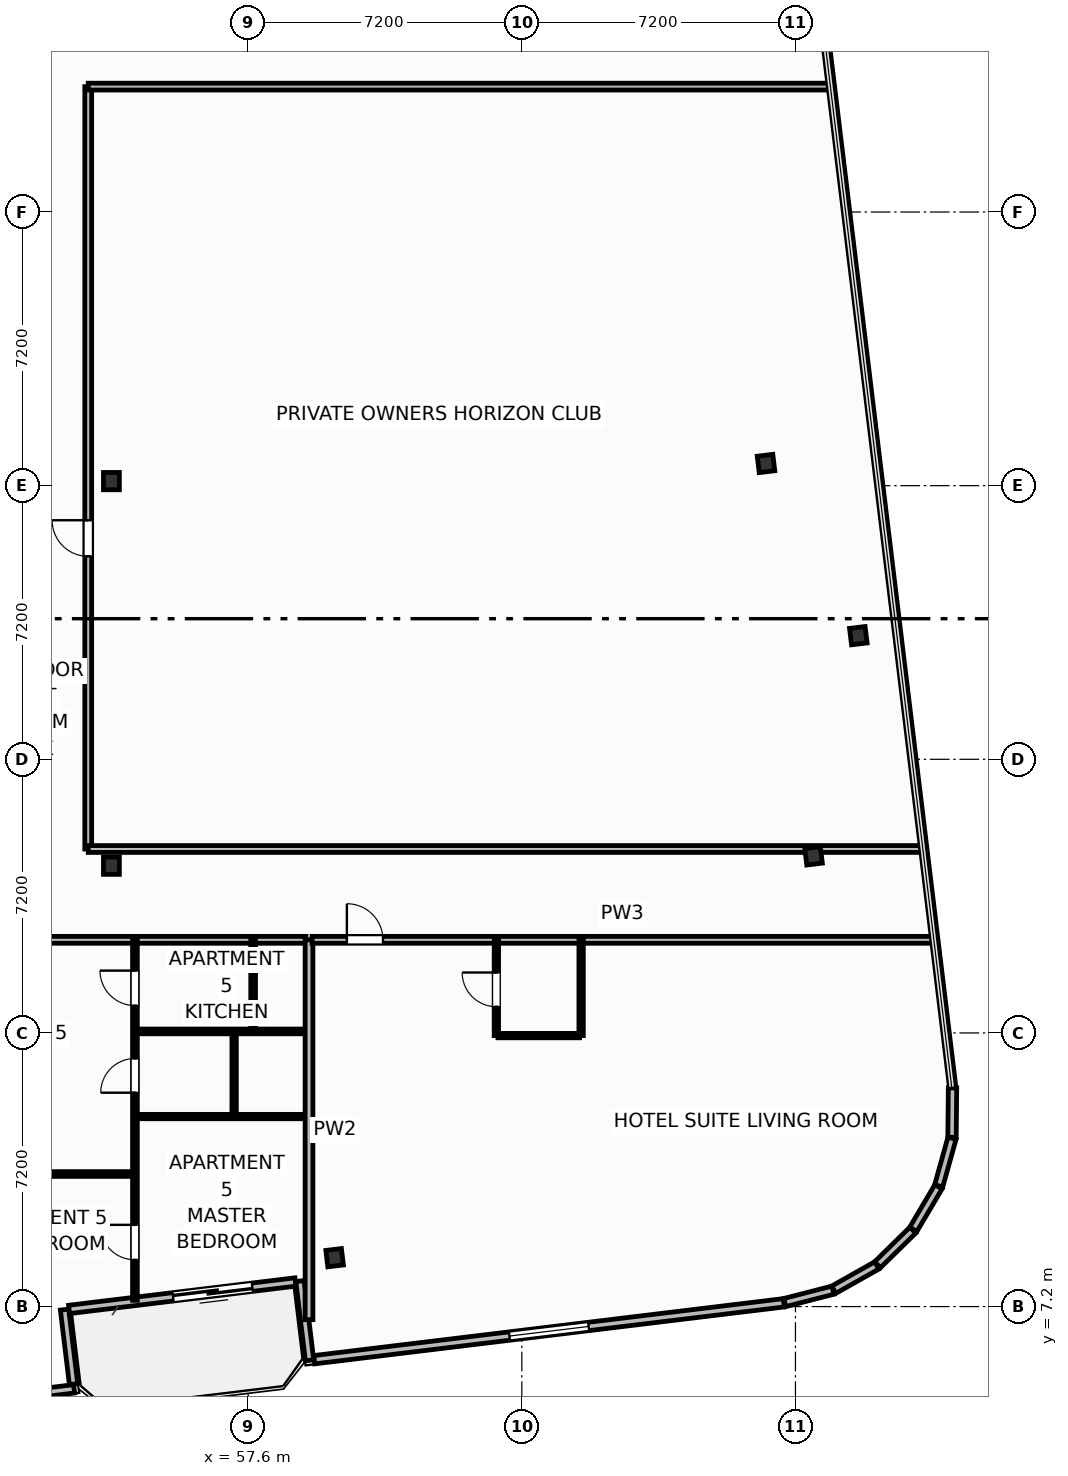
"""IFC4 building model, lengths in metres.
Left out: names, types, materials, properties, quantities, classifications, styles, units other than length and angle.
Written with IfcOpenShell. Run it as: python <this file> out.ifc"""

import sys

from ifc_helpers import new_model, si_unit, direction, frame, frame_2d, origin, origin_2d, place, context, subcontext, project, spatial, rectangle, i_section, extrude, element, fill, save


model = new_model("IFC4")
c1 = context("Model", 3, precision=1e-05, world=origin(), true_north=direction((0.0, 1.0)))
c2 = subcontext(c1, "Body", "Model", "MODEL_VIEW")
j1 = project(units=[si_unit("LENGTHUNIT", "METRE"), si_unit("PLANEANGLEUNIT", "RADIAN")], contexts=[c1])
p1 = place(None, origin())
s1 = spatial("IfcSite", under=j1, at=p1, CompositionType="ELEMENT")
p2 = place(p1, origin())
s2 = spatial("IfcBuilding", under=s1, at=p2, CompositionType="ELEMENT")
p3 = place(p2, frame((0.0, 0.0, 174.6)))
s3 = spatial("IfcBuildingStorey", under=s2, at=p3, CompositionType="ELEMENT", Elevation=174.6)
for number, where, z_axis, x_axis in (
    (1, (54.0, 18.8, 0.0), (0.0, 0.0, 1.0), (1.0, 0.0, 0.0)),
    (2, (54.0, 28.92, 0.0), (0.0, 0.0, 1.0), (1.0, 0.0, 0.0)),
):
    element("IfcColumn", number, at=place(p3, frame(where, z_axis=z_axis, x_axis=x_axis)), inside=s3, PredefinedType="COLUMN", context=c2, shape_type="SweptSolid", body=[
        extrude(i_section(OverallWidth=0.418, OverallDepth=0.455, WebThickness=0.042, FlangeThickness=0.068, FilletRadius=0.025, at=origin_2d()), origin(), (0.0, 0.0, 1.0), 3.7),
    ])
for number, where, z_axis, x_axis in (
    (3, (59.874, 8.486, 0.0), (0.0, 0.0, 1.0), (0.993, 0.12, 0.0)),
    (4, (72.477, 19.059, 0.0), (0.0, 0.0, 1.0), (0.993, 0.12, 0.0)),
    (5, (73.654, 24.853, 0.0), (0.0, 0.0, 1.0), (0.993, 0.12, 0.0)),
    (6, (71.225, 29.384, 0.0), (0.0, 0.0, 1.0), (0.993, 0.12, 0.0)),
):
    element("IfcColumn", number, at=place(p3, frame(where, z_axis=z_axis, x_axis=x_axis)), inside=s3, PredefinedType="COLUMN", context=c2, shape_type="SweptSolid", body=[
        extrude(i_section(OverallWidth=0.412, OverallDepth=0.435, WebThickness=0.036, FlangeThickness=0.057, FilletRadius=0.025, at=origin_2d()), origin(), (0.0, 0.0, 1.0), 3.7),
    ])
p4 = place(p3, frame((58.843, 7.847, 0.0), z_axis=(0.0, 0.0, 1.0), x_axis=(-0.992729951822, -0.120362962556, 0.0)))
e7 = element("IfcWall", 7, at=p4, inside=s3, PredefinedType="SOLIDWALL", context=c2, shape_type="SweptSolid", body=[
    extrude(rectangle(XDim=6.0, YDim=0.22, at=frame_2d((3.0, 0.0))), origin(), (0.0, 0.0, 1.0), 2.73),
])
p5 = place(p4, frame((1.144, 0.0, 0.0)))
e8 = element("IfcOpeningElement", 8, at=p5, cuts=e7, PredefinedType="OPENING", context=c2, shape_type="SweptSolid", body=[
    extrude(rectangle(XDim=2.1, YDim=2.3, at=frame_2d((1.05, 1.15))), frame((0.0, 0.12, 0.0), z_axis=(0.0, -1.0, 0.0), x_axis=(1.0, 0.0, 0.0)), (0.0, 0.0, 1.0), 0.24),
])
p6 = place(p3, frame((45.042, 4.069, 0.0), z_axis=(0.0, 0.0, 1.0), x_axis=(0.992731032022, 0.120354052946, 0.0)))
e9 = element("IfcWall", 9, at=p6, inside=s3, PredefinedType="SOLIDWALL", context=c2, shape_type="SweptSolid", body=[
    extrude(rectangle(XDim=8.035, YDim=0.22, at=frame_2d((4.018, 0.0))), origin(), (0.0, 0.0, 1.0), 2.73),
])
p7 = place(p6, frame((4.273, 0.0, 0.8)))
e10 = element("IfcOpeningElement", 10, at=p7, cuts=e9, PredefinedType="OPENING", context=c2, shape_type="SweptSolid", body=[
    extrude(rectangle(XDim=2.1, YDim=1.75, at=frame_2d((1.05, 0.875))), frame((0.0, 0.12, 0.0), z_axis=(0.0, -1.0, 0.0), x_axis=(1.0, 0.0, 0.0)), (0.0, 0.0, 1.0), 0.24),
])
p8 = place(p3, frame((53.004, 5.16, 0.0), z_axis=(0.0, 0.0, 1.0), x_axis=(-0.120397815541, 0.992725725472, 0.0)))
e11 = element("IfcWall", 11, at=p8, inside=s3, PredefinedType="SOLIDWALL", context=c2, shape_type="SweptSolid", body=[
    extrude(rectangle(XDim=1.975, YDim=0.22, at=frame_2d((0.988, 0.0))), origin(), (0.0, 0.0, 1.0), 2.73),
])
p9 = place(p3, frame((58.961, 7.872, 0.0), z_axis=(0.0, 0.0, 1.0), x_axis=(0.120327895535, -0.992734202874, 0.0)))
e12 = element("IfcWall", 12, at=p9, inside=s3, PredefinedType="SOLIDWALL", context=c2, shape_type="SweptSolid", body=[
    extrude(rectangle(XDim=2.1, YDim=0.22, at=frame_2d((1.05, 0.0))), origin(), (0.0, 0.0, 1.0), 2.73),
])
p10 = place(p3, frame((59.338, 5.802, 0.0), z_axis=(0.0, 0.0, 1.0), x_axis=(0.992731225757, 0.120352454927, 0.0)))
e13 = element("IfcWall", 13, at=p10, inside=s3, PredefinedType="SOLIDWALL", context=c2, shape_type="SweptSolid", body=[
    extrude(rectangle(XDim=12.447, YDim=0.22, at=frame_2d((6.224, 0.0))), origin(), (0.0, 0.0, 1.0), 2.73),
])
p11 = place(p10, frame((5.174, 0.0, 0.8)))
e14 = element("IfcOpeningElement", 14, at=p11, cuts=e13, PredefinedType="OPENING", context=c2, shape_type="SweptSolid", body=[
    extrude(rectangle(XDim=2.1, YDim=1.75, at=frame_2d((1.05, 0.875))), frame((0.0, 0.12, 0.0), z_axis=(0.0, -1.0, 0.0), x_axis=(1.0, 0.0, 0.0)), (0.0, 0.0, 1.0), 0.24),
])
p12 = place(p3, frame((71.719, 7.306, 0.0), z_axis=(0.0, 0.0, 1.0), x_axis=(0.968541764193, 0.248851061909, 0.0)))
e15 = element("IfcWall", 15, at=p12, inside=s3, PredefinedType="SOLIDWALL", context=c2, shape_type="SweptSolid", body=[
    extrude(rectangle(XDim=1.309, YDim=0.22, at=frame_2d((0.654, 0.0))), origin(), (0.0, 0.0, 1.0), 2.73),
])
for number, where, z_axis, x_axis in (
    (16, (73.008, 7.644, 0.0), (0.0, 0.0, 1.0), (0.871, 0.491, 0.0)),
    (17, (74.159, 8.3, 0.0), (0.0, 0.0, 1.0), (0.714, 0.7, 0.0)),
    (18, (75.101, 9.232, 0.0), (0.0, 0.0, 1.0), (0.509, 0.861, 0.0)),
    (19, (75.77, 10.376, 0.0), (0.0, 0.0, 1.0), (0.269, 0.963, 0.0)),
):
    element("IfcWall", number, at=place(p3, frame(where, z_axis=z_axis, x_axis=x_axis)), inside=s3, PredefinedType="SOLIDWALL", context=c2, shape_type="SweptSolid", body=[
        extrude(rectangle(XDim=1.301, YDim=0.22, at=frame_2d((0.65, 0.0))), origin(), (0.0, 0.0, 1.0), 2.73),
    ])
p13 = place(p3, frame((76.12, 11.654, 0.0), z_axis=(0.0, 0.0, 1.0), x_axis=(0.01032033607, 0.999946743914, 0.0)))
e20 = element("IfcWall", 20, at=p13, inside=s3, PredefinedType="SOLIDWALL", context=c2, shape_type="SweptSolid", body=[
    extrude(rectangle(XDim=1.301, YDim=0.22, at=frame_2d((0.65, 0.0))), origin(), (0.0, 0.0, 1.0), 2.73),
])
p14 = place(p3, frame((48.48, 10.688, 0.0), z_axis=(0.0, 0.0, 1.0), x_axis=(1.0, 0.0, 0.0)))
e21 = element("IfcWall", 21, at=p14, inside=s3, PredefinedType="PARTITIONING", context=c2, shape_type="SweptSolid", body=[
    extrude(rectangle(XDim=6.069, YDim=0.125, at=frame_2d((3.035, 0.0))), origin(), (0.0, 0.0, 1.0), 3.45),
])
p15 = place(p14, frame((2.731, 0.0, 0.0)))
e22 = element("IfcOpeningElement", 22, at=p15, cuts=e21, PredefinedType="OPENING", context=c2, shape_type="SweptSolid", body=[
    extrude(rectangle(XDim=0.92, YDim=2.05, at=frame_2d((0.46, 1.025))), frame((0.0, 0.073, 0.0), z_axis=(0.0, -1.0, 0.0), x_axis=(1.0, 0.0, 0.0)), (0.0, 0.0, 1.0), 0.145),
])
p16 = place(p3, frame((48.48, 16.85, 0.0), z_axis=(0.0, 0.0, 1.0), x_axis=(1.0, 0.0, 0.0)))
e23 = element("IfcWall", 23, at=p16, inside=s3, PredefinedType="PARTITIONING", context=c2, shape_type="SweptSolid", body=[
    extrude(rectangle(XDim=10.64, YDim=0.18, at=frame_2d((5.32, 0.0))), origin(), (0.0, 0.0, 1.0), 3.45),
])
p17 = place(p16, frame((2.535, 0.0, 0.0)))
e24 = element("IfcOpeningElement", 24, at=p17, cuts=e23, PredefinedType="OPENING", context=c2, shape_type="SweptSolid", body=[
    extrude(rectangle(XDim=1.0, YDim=2.2, at=frame_2d((0.5, 1.1))), frame((0.0, 0.1, 0.0), z_axis=(0.0, -1.0, 0.0), x_axis=(1.0, 0.0, 0.0)), (0.0, 0.0, 1.0), 0.2),
])
p18 = place(p3, frame((54.619, 7.365, 0.0), z_axis=(0.0, 0.0, 1.0), x_axis=(0.0, 1.0, 0.0)))
e25 = element("IfcWall", 25, at=p18, inside=s3, PredefinedType="PARTITIONING", context=c2, shape_type="SweptSolid", body=[
    extrude(rectangle(XDim=9.485, YDim=0.125, at=frame_2d((4.742, 0.0))), origin(), (0.0, 0.0, 1.0), 3.45),
])
p19 = place(p18, frame((1.065, 0.0, 0.0)))
e26 = element("IfcOpeningElement", 26, at=p19, cuts=e25, PredefinedType="OPENING", context=c2, shape_type="SweptSolid", body=[
    extrude(rectangle(XDim=0.92, YDim=2.05, at=frame_2d((0.46, 1.025))), frame((0.0, 0.073, 0.0), z_axis=(0.0, -1.0, 0.0), x_axis=(1.0, 0.0, 0.0)), (0.0, 0.0, 1.0), 0.145),
])
p20 = place(p18, frame((5.462, 0.0, 0.0)))
e27 = element("IfcOpeningElement", 27, at=p20, cuts=e25, PredefinedType="OPENING", context=c2, shape_type="SweptSolid", body=[
    extrude(rectangle(XDim=0.9, YDim=2.05, at=frame_2d((0.45, 1.025))), frame((0.0, 0.073, 0.0), z_axis=(0.0, -1.0, 0.0), x_axis=(1.0, 0.0, 0.0)), (0.0, 0.0, 1.0), 0.145),
])
p21 = place(p18, frame((7.755, 0.0, 0.0)))
e28 = element("IfcOpeningElement", 28, at=p21, cuts=e25, PredefinedType="OPENING", context=c2, shape_type="SweptSolid", body=[
    extrude(rectangle(XDim=0.92, YDim=2.05, at=frame_2d((0.46, 1.025))), frame((0.0, 0.073, 0.0), z_axis=(0.0, -1.0, 0.0), x_axis=(1.0, 0.0, 0.0)), (0.0, 0.0, 1.0), 0.145),
])
p22 = place(p3, frame((54.689, 14.44, 0.0), z_axis=(0.0, 0.0, 1.0), x_axis=(1.0, 0.0, 0.0)))
e29 = element("IfcWall", 29, at=p22, inside=s3, PredefinedType="PARTITIONING", context=c2, shape_type="SweptSolid", body=[
    extrude(rectangle(XDim=4.431, YDim=0.125, at=frame_2d((2.215, 0.0))), origin(), (0.0, 0.0, 1.0), 3.45),
])
p23 = place(p3, frame((54.689, 12.2, 0.0), z_axis=(0.0, 0.0, 1.0), x_axis=(1.0, 0.0, 0.0)))
e30 = element("IfcWall", 30, at=p23, inside=s3, PredefinedType="PARTITIONING", context=c2, shape_type="SweptSolid", body=[
    extrude(rectangle(XDim=4.431, YDim=0.115, at=frame_2d((2.215, 0.0))), origin(), (0.0, 0.0, 1.0), 3.018),
])
p24 = place(p3, frame((57.729, 14.44, 0.0), z_axis=(0.0, 0.0, 1.0), x_axis=(0.0, 1.0, 0.0)))
e31 = element("IfcWall", 31, at=p24, inside=s3, PredefinedType="PARTITIONING", context=c2, shape_type="SweptSolid", body=[
    extrude(rectangle(XDim=2.41, YDim=0.125, at=frame_2d((1.205, 0.0))), origin(), (0.0, 0.0, 1.0), 3.45),
])
p25 = place(p3, frame((57.229, 12.2, 0.0), z_axis=(0.0, 0.0, 1.0), x_axis=(0.0, 1.0, 0.0)))
e32 = element("IfcWall", 32, at=p25, inside=s3, PredefinedType="PARTITIONING", context=c2, shape_type="SweptSolid", body=[
    extrude(rectangle(XDim=2.24, YDim=0.115, at=frame_2d((1.12, 0.0))), origin(), (0.0, 0.0, 1.0), 3.45),
])
p26 = place(p3, frame((59.2, 6.856, 0.0), z_axis=(0.0, 0.0, 1.0), x_axis=(0.0, 1.0, 0.0)))
e33 = element("IfcWall", 33, at=p26, inside=s3, PredefinedType="PARTITIONING", context=c2, shape_type="SweptSolid", body=[
    extrude(rectangle(XDim=9.994, YDim=0.205, at=frame_2d((4.997, 0.0))), origin(), (0.0, 0.0, 1.0), 3.45),
])
p27 = place(p3, frame((59.28, 16.85, 0.0), z_axis=(0.0, 0.0, 1.0), x_axis=(1.0, 0.0, 0.0)))
e34 = element("IfcWall", 34, at=p27, inside=s3, PredefinedType="PARTITIONING", context=c2, shape_type="SweptSolid", body=[
    extrude(rectangle(XDim=16.322, YDim=0.18, at=frame_2d((8.161, 0.0))), origin(), (0.0, 0.0, 1.0), 3.45),
])
p28 = place(p27, frame((0.916, 0.0, 0.0)))
e35 = element("IfcOpeningElement", 35, at=p28, cuts=e34, PredefinedType="OPENING", context=c2, shape_type="SweptSolid", body=[
    extrude(rectangle(XDim=0.95, YDim=2.15, at=frame_2d((0.475, 1.075))), frame((0.0, 0.1, 0.0), z_axis=(0.0, -1.0, 0.0), x_axis=(1.0, 0.0, 0.0)), (0.0, 0.0, 1.0), 0.2),
])
p29 = place(p3, frame((64.17, 14.33, 0.0), z_axis=(0.0, 0.0, 1.0), x_axis=(1.0, 0.0, 0.0)))
e36 = element("IfcWall", 36, at=p29, inside=s3, PredefinedType="PARTITIONING", context=c2, shape_type="SweptSolid", body=[
    extrude(rectangle(XDim=2.15, YDim=0.115, at=frame_2d((1.075, 0.0))), origin(), (0.0, 0.0, 1.0), 3.45),
])
p30 = place(p3, frame((64.13, 14.33, 0.0), z_axis=(0.0, 0.0, 1.0), x_axis=(0.0, 1.0, 0.0)))
e37 = element("IfcWall", 37, at=p30, inside=s3, PredefinedType="PARTITIONING", context=c2, shape_type="SweptSolid", body=[
    extrude(rectangle(XDim=2.52, YDim=0.115, at=frame_2d((1.26, 0.0))), origin(), (0.0, 0.0, 1.0), 3.45),
])
p31 = place(p30, frame((0.76, 0.0, 0.0)))
e38 = element("IfcOpeningElement", 38, at=p31, cuts=e37, PredefinedType="OPENING", context=c2, shape_type="SweptSolid", body=[
    extrude(rectangle(XDim=0.9, YDim=2.05, at=frame_2d((0.45, 1.025))), frame((0.0, 0.067, 0.0), z_axis=(0.0, -1.0, 0.0), x_axis=(1.0, 0.0, 0.0)), (0.0, 0.0, 1.0), 0.135),
])
p32 = place(p3, frame((66.36, 14.33, 0.0), z_axis=(0.0, 0.0, 1.0), x_axis=(0.0, 1.0, 0.0)))
e39 = element("IfcWall", 39, at=p32, inside=s3, PredefinedType="PARTITIONING", context=c2, shape_type="SweptSolid", body=[
    extrude(rectangle(XDim=2.52, YDim=0.115, at=frame_2d((1.26, 0.0))), origin(), (0.0, 0.0, 1.0), 3.45),
])
p33 = place(p3, frame((53.39, 19.24, 0.0), z_axis=(0.0, 0.0, 1.0), x_axis=(0.0, 1.0, 0.0)))
e40 = element("IfcWall", 40, at=p33, inside=s3, PredefinedType="PARTITIONING", context=c2, shape_type="SweptSolid", body=[
    extrude(rectangle(XDim=20.06, YDim=0.18, at=frame_2d((10.03, 0.0))), origin(), (0.0, 0.0, 1.0), 3.45),
])
p34 = place(p33, frame((7.7, 0.0, 0.0)))
e41 = element("IfcOpeningElement", 41, at=p34, cuts=e40, PredefinedType="OPENING", context=c2, shape_type="SweptSolid", body=[
    extrude(rectangle(XDim=0.95, YDim=2.05, at=frame_2d((0.475, 1.025))), frame((0.0, 0.1, 0.0), z_axis=(0.0, -1.0, 0.0), x_axis=(1.0, 0.0, 0.0)), (0.0, 0.0, 1.0), 0.2),
])
p35 = place(p3, frame((53.39, 19.24, 0.0), z_axis=(0.0, 0.0, 1.0), x_axis=(1.0, 0.0, 0.0)))
e42 = element("IfcWall", 42, at=p35, inside=s3, PredefinedType="PARTITIONING", context=c2, shape_type="SweptSolid", body=[
    extrude(rectangle(XDim=21.922, YDim=0.18, at=frame_2d((10.961, 0.0))), origin(), (0.0, 0.0, 1.0), 2.662),
])
p36 = place(p3, frame((53.39, 39.3, 0.0), z_axis=(0.0, 0.0, 1.0), x_axis=(1.0, 0.0, 0.0)))
e43 = element("IfcWall", 43, at=p36, inside=s3, PredefinedType="PARTITIONING", context=c2, shape_type="SweptSolid", body=[
    extrude(rectangle(XDim=19.49, YDim=0.18, at=frame_2d((9.745, 0.0))), origin(), (0.0, 0.0, 1.0), 3.45),
])
p37 = place(p5, origin())
e44 = element("IfcDoor", 44, at=p37, inside=s3, OperationType="SLIDING_TO_LEFT", PredefinedType="DOOR", context=c2, shape_type="SweptSolid", body=[
    extrude(rectangle(XDim=2.1, YDim=2.3, at=frame_2d((1.05, 1.15))), frame((0.0, 0.025, 0.0), z_axis=(0.0, -1.0, 0.0), x_axis=(1.0, 0.0, 0.0)), (0.0, 0.0, 1.0), 0.05),
])
fill(e8, e44)
p38 = place(p11, origin())
e45 = element("IfcWindow", 45, at=p38, inside=s3, PartitioningType="SINGLE_PANEL", PredefinedType="WINDOW", context=c2, shape_type="SweptSolid", body=[
    extrude(rectangle(XDim=2.1, YDim=1.75, at=frame_2d((1.05, 0.875))), frame((0.0, 0.03, 0.0), z_axis=(0.0, -1.0, 0.0), x_axis=(1.0, 0.0, 0.0)), (0.0, 0.0, 1.0), 0.06),
])
fill(e14, e45)
p39 = place(p19, origin())
e46 = element("IfcDoor", 46, at=p39, inside=s3, OperationType="SINGLE_SWING_RIGHT", PredefinedType="DOOR", context=c2, shape_type="SweptSolid", body=[
    extrude(rectangle(XDim=0.92, YDim=2.05, at=frame_2d((0.46, 1.025))), frame((0.0, 0.025, 0.0), z_axis=(0.0, -1.0, 0.0), x_axis=(1.0, 0.0, 0.0)), (0.0, 0.0, 1.0), 0.05),
])
fill(e26, e46)
p40 = place(p20, origin())
e47 = element("IfcDoor", 47, at=p40, inside=s3, OperationType="SINGLE_SWING_LEFT", PredefinedType="DOOR", context=c2, shape_type="SweptSolid", body=[
    extrude(rectangle(XDim=0.9, YDim=2.05, at=frame_2d((0.45, 1.025))), frame((0.0, 0.025, 0.0), z_axis=(0.0, -1.0, 0.0), x_axis=(1.0, 0.0, 0.0)), (0.0, 0.0, 1.0), 0.05),
])
fill(e27, e47)
p41 = place(p21, origin())
e48 = element("IfcDoor", 48, at=p41, inside=s3, OperationType="SINGLE_SWING_RIGHT", PredefinedType="DOOR", context=c2, shape_type="SweptSolid", body=[
    extrude(rectangle(XDim=0.92, YDim=2.05, at=frame_2d((0.46, 1.025))), frame((0.0, 0.025, 0.0), z_axis=(0.0, -1.0, 0.0), x_axis=(1.0, 0.0, 0.0)), (0.0, 0.0, 1.0), 0.05),
])
fill(e28, e48)
p42 = place(p28, origin())
e49 = element("IfcDoor", 49, at=p42, inside=s3, OperationType="SINGLE_SWING_LEFT", PredefinedType="DOOR", context=c2, shape_type="SweptSolid", body=[
    extrude(rectangle(XDim=0.95, YDim=2.15, at=frame_2d((0.475, 1.075))), frame((0.0, 0.025, 0.0), z_axis=(0.0, -1.0, 0.0), x_axis=(1.0, 0.0, 0.0)), (0.0, 0.0, 1.0), 0.05),
])
fill(e35, e49)
p43 = place(p31, origin())
e50 = element("IfcDoor", 50, at=p43, inside=s3, OperationType="SINGLE_SWING_RIGHT", PredefinedType="DOOR", context=c2, shape_type="SweptSolid", body=[
    extrude(rectangle(XDim=0.9, YDim=2.05, at=frame_2d((0.45, 1.025))), frame((0.0, 0.025, 0.0), z_axis=(0.0, -1.0, 0.0), x_axis=(1.0, 0.0, 0.0)), (0.0, 0.0, 1.0), 0.05),
])
fill(e38, e50)
p44 = place(p34, origin())
e51 = element("IfcDoor", 51, at=p44, inside=s3, OperationType="SINGLE_SWING_RIGHT", PredefinedType="DOOR", context=c2, shape_type="SweptSolid", body=[
    extrude(rectangle(XDim=0.95, YDim=2.05, at=frame_2d((0.475, 1.025))), frame((0.0, 0.025, 0.0), z_axis=(0.0, -1.0, 0.0), x_axis=(1.0, 0.0, 0.0)), (0.0, 0.0, 1.0), 0.05),
])
fill(e41, e51)
save(model, sys.argv[1])
